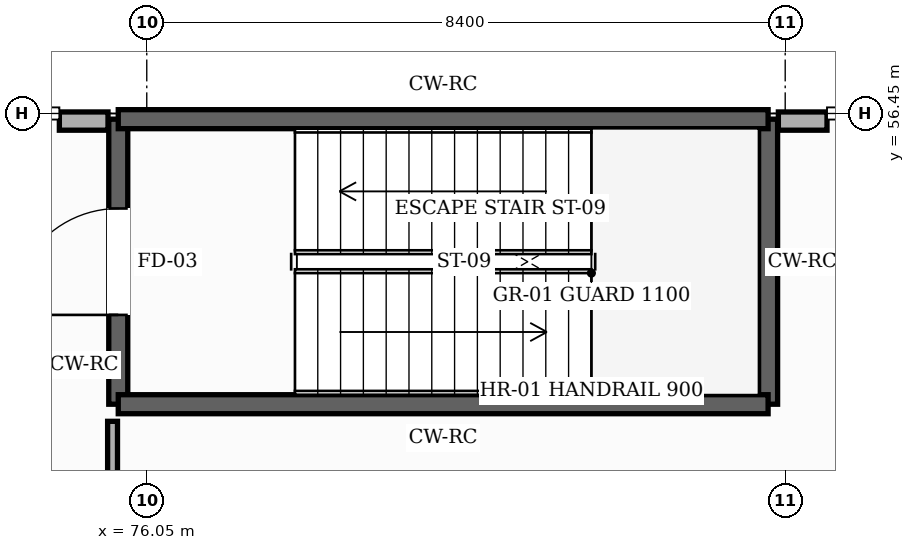
"""IFC4 building model, lengths in metres.
Left out: names, types, materials, properties, quantities, classifications, styles, units other than length and angle.
Written with IfcOpenShell. Run it as: python <this file> out.ifc"""

import sys

from ifc_helpers import new_model, si_unit, direction, frame, frame_2d, origin, place, context, subcontext, project, spatial, rectangle, extrude, element, fill, save


model = new_model("IFC4")
c1 = context("Model", 3, precision=1e-05, world=origin(), true_north=direction((0.0, 1.0)))
c2 = subcontext(c1, "Body", "Model", "MODEL_VIEW")
j1 = project(units=[si_unit("LENGTHUNIT", "METRE"), si_unit("PLANEANGLEUNIT", "RADIAN")], contexts=[c1])
p1 = place(None, origin())
s1 = spatial("IfcSite", under=j1, at=p1, CompositionType="ELEMENT")
p2 = place(p1, origin())
s2 = spatial("IfcBuilding", under=s1, at=p2, CompositionType="ELEMENT")
p3 = place(p2, frame((0.0, 0.0, 5.4)))
s3 = spatial("IfcBuildingStorey", under=s2, at=p3, CompositionType="ELEMENT", Elevation=5.4)
p4 = place(p3, frame((74.9, 56.35, 0.0), z_axis=(0.0, 0.0, 1.0), x_axis=(1.0, 0.0, 0.0)))
e1 = element("IfcWall", 1, at=p4, inside=s3, PredefinedType="SOLIDWALL", context=c2, shape_type="SweptSolid", body=[
    extrude(rectangle(XDim=0.64, YDim=0.24, at=frame_2d((0.32, 0.0))), origin(), (0.0, 0.0, 1.0), 3.125),
])
p5 = place(p3, frame((84.36, 56.35, 0.0), z_axis=(0.0, 0.0, 1.0), x_axis=(1.0, 0.0, 0.0)))
e2 = element("IfcWall", 2, at=p5, inside=s3, PredefinedType="SOLIDWALL", context=c2, shape_type="SweptSolid", body=[
    extrude(rectangle(XDim=0.64, YDim=0.24, at=frame_2d((0.32, 0.0))), origin(), (0.0, 0.0, 1.0), 3.125),
])
p6 = place(p3, frame((75.675, 52.625, 0.0), z_axis=(0.0, 0.0, 1.0), x_axis=(0.0, 1.0, 0.0)))
e3 = element("IfcWall", 3, at=p6, inside=s3, PredefinedType="SHEAR", context=c2, shape_type="SweptSolid", body=[
    extrude(rectangle(XDim=3.75, YDim=0.25, at=frame_2d((1.875, 0.0))), origin(), (0.0, 0.0, 1.0), 4.55),
])
p7 = place(p6, frame((1.175, 0.0, 0.0)))
e4 = element("IfcOpeningElement", 4, at=p7, cuts=e3, PredefinedType="OPENING", context=c2, shape_type="SweptSolid", body=[
    extrude(rectangle(XDim=1.4, YDim=2.25, at=frame_2d((0.7, 1.125))), frame((0.0, 0.135, 0.0), z_axis=(0.0, -1.0, 0.0), x_axis=(1.0, 0.0, 0.0)), (0.0, 0.0, 1.0), 0.27),
])
p8 = place(p3, frame((84.225, 56.375, 0.0), z_axis=(0.0, 0.0, 1.0), x_axis=(0.0, -1.0, 0.0)))
e5 = element("IfcWall", 5, at=p8, inside=s3, PredefinedType="SHEAR", context=c2, shape_type="SweptSolid", body=[
    extrude(rectangle(XDim=3.75, YDim=0.25, at=frame_2d((1.875, 0.0))), origin(), (0.0, 0.0, 1.0), 4.55),
])
for number, where, z_axis, x_axis in (
    (6, (84.225, 52.625, 0.0), (0.0, 0.0, 1.0), (-1.0, 0.0, 0.0)),
    (7, (75.675, 56.375, 0.0), (0.0, 0.0, 1.0), (1.0, 0.0, 0.0)),
):
    element("IfcWall", number, at=place(p3, frame(where, z_axis=z_axis, x_axis=x_axis)), inside=s3, PredefinedType="SHEAR", context=c2, shape_type="SweptSolid", body=[
        extrude(rectangle(XDim=8.55, YDim=0.25, at=frame_2d((4.275, 0.0))), origin(), (0.0, 0.0, 1.0), 4.55),
    ])
p9 = place(p3, frame((75.6, 16.6, 0.0), z_axis=(0.0, 0.0, 1.0), x_axis=(0.0, 1.0, 0.0)))
e8 = element("IfcWall", 8, at=p9, inside=s3, PredefinedType="PARTITIONING", context=c2, shape_type="SweptSolid", body=[
    extrude(rectangle(XDim=35.8, YDim=0.13, at=frame_2d((17.9, 0.0))), origin(), (0.0, 0.0, 1.0), 4.535),
])
p10 = place(p9, frame((7.925, 0.0, 0.0)))
e9 = element("IfcOpeningElement", 9, at=p10, cuts=e8, PredefinedType="OPENING", context=c2, shape_type="SweptSolid", body=[
    extrude(rectangle(XDim=2.05, YDim=2.45, at=frame_2d((1.025, 1.225))), frame((0.0, 0.075, 0.0), z_axis=(0.0, -1.0, 0.0), x_axis=(1.0, 0.0, 0.0)), (0.0, 0.0, 1.0), 0.15),
])
p11 = place(p9, frame((25.925, 0.0, 0.0)))
e10 = element("IfcOpeningElement", 10, at=p11, cuts=e8, PredefinedType="OPENING", context=c2, shape_type="SweptSolid", body=[
    extrude(rectangle(XDim=1.85, YDim=2.4, at=frame_2d((0.925, 1.2))), frame((0.0, 0.075, 0.0), z_axis=(0.0, -1.0, 0.0), x_axis=(1.0, 0.0, 0.0)), (0.0, 0.0, 1.0), 0.15),
])
p12 = place(p7, origin())
e11 = element("IfcDoor", 11, at=p12, inside=s3, OperationType="SINGLE_SWING_LEFT", PredefinedType="DOOR", context=c2, shape_type="SweptSolid", body=[
    extrude(rectangle(XDim=1.4, YDim=2.25, at=frame_2d((0.7, 1.125))), frame((0.0, 0.025, 0.0), z_axis=(0.0, -1.0, 0.0), x_axis=(1.0, 0.0, 0.0)), (0.0, 0.0, 1.0), 0.05),
])
fill(e4, e11)
save(model, sys.argv[1])
